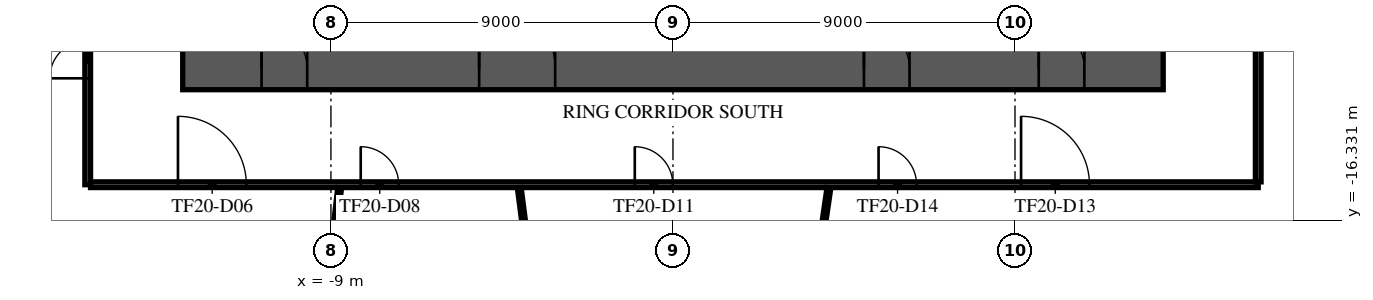
"""IFC4 building model, lengths in metres.
Left out: names, types, materials, properties, quantities, classifications, styles, units other than length and angle.
Written with IfcOpenShell. Run it as: python <this file> out.ifc"""

import sys

from ifc_helpers import new_model, si_unit, direction, frame, frame_2d, origin, place, context, subcontext, project, spatial, rectangle, extrude, element, fill, save


model = new_model("IFC4")
c1 = context("Model", 3, precision=1e-05, world=origin(), true_north=direction((0.0, 1.0)))
c2 = subcontext(c1, "Body", "Model", "MODEL_VIEW")
j1 = project(units=[si_unit("LENGTHUNIT", "METRE"), si_unit("PLANEANGLEUNIT", "RADIAN")], contexts=[c1])
p1 = place(None, origin())
s1 = spatial("IfcSite", under=j1, at=p1, CompositionType="ELEMENT")
p2 = place(p1, origin())
s2 = spatial("IfcBuilding", under=s1, at=p2, CompositionType="ELEMENT")
p3 = place(p2, frame((0.0, 0.0, 90.1)))
s3 = spatial("IfcBuildingStorey", under=s2, at=p3, CompositionType="ELEMENT", Elevation=90.1)
p4 = place(p3, frame((-12.9, -12.35, 0.0), z_axis=(0.0, 0.0, 1.0), x_axis=(1.0, 0.0, 0.0)))
e1 = element("IfcWall", 1, at=p4, inside=s3, PredefinedType="SHEAR", context=c2, shape_type="SweptSolid", body=[
    extrude(rectangle(XDim=25.8, YDim=1.1, at=frame_2d((12.9, 0.0))), origin(), (0.0, 0.0, 1.0), 3.58),
])
p5 = place(p4, frame((7.8, 0.0, 0.0)))
e2 = element("IfcOpeningElement", 2, at=p5, cuts=e1, PredefinedType="OPENING", context=c2, shape_type="SweptSolid", body=[
    extrude(rectangle(XDim=2.0, YDim=2.1, at=frame_2d((1.0, 1.05))), frame((0.0, 0.56, 0.0), z_axis=(0.0, -1.0, 0.0), x_axis=(1.0, 0.0, 0.0)), (0.0, 0.0, 1.0), 1.12),
])
p6 = place(p4, frame((17.925, 0.0, 0.0)))
e3 = element("IfcOpeningElement", 3, at=p6, cuts=e1, PredefinedType="OPENING", context=c2, shape_type="SweptSolid", body=[
    extrude(rectangle(XDim=1.2, YDim=2.1, at=frame_2d((0.6, 1.05))), frame((0.0, 0.56, 0.0), z_axis=(0.0, -1.0, 0.0), x_axis=(1.0, 0.0, 0.0)), (0.0, 0.0, 1.0), 1.12),
])
p7 = place(p4, frame((2.075, 0.0, 0.0)))
e4 = element("IfcOpeningElement", 4, at=p7, cuts=e1, PredefinedType="OPENING", context=c2, shape_type="SweptSolid", body=[
    extrude(rectangle(XDim=1.2, YDim=2.1, at=frame_2d((0.6, 1.05))), frame((0.0, 0.56, 0.0), z_axis=(0.0, -1.0, 0.0), x_axis=(1.0, 0.0, 0.0)), (0.0, 0.0, 1.0), 1.12),
])
p8 = place(p4, frame((22.525, 0.0, 0.0)))
e5 = element("IfcOpeningElement", 5, at=p8, cuts=e1, PredefinedType="OPENING", context=c2, shape_type="SweptSolid", body=[
    extrude(rectangle(XDim=1.2, YDim=2.1, at=frame_2d((0.6, 1.05))), frame((0.0, 0.56, 0.0), z_axis=(0.0, -1.0, 0.0), x_axis=(1.0, 0.0, 0.0)), (0.0, 0.0, 1.0), 1.12),
])
p9 = place(p3, frame((-15.4, -15.4, 0.0), z_axis=(0.0, 0.0, 1.0), x_axis=(0.0, 1.0, 0.0)))
e6 = element("IfcWall", 6, at=p9, inside=s3, PredefinedType="PARTITIONING", context=c2, shape_type="SweptSolid", body=[
    extrude(rectangle(XDim=30.8, YDim=0.15, at=frame_2d((15.4, 0.0))), origin(), (0.0, 0.0, 1.0), 3.08),
])
p10 = place(p9, frame((22.967, 0.0, 0.0)))
e7 = element("IfcOpeningElement", 7, at=p10, cuts=e6, PredefinedType="OPENING", context=c2, shape_type="SweptSolid", body=[
    extrude(rectangle(XDim=1.8, YDim=2.1, at=frame_2d((0.9, 1.05))), frame((0.0, 0.085, 0.0), z_axis=(0.0, -1.0, 0.0), x_axis=(1.0, 0.0, 0.0)), (0.0, 0.0, 1.0), 0.17),
])
p11 = place(p9, frame((19.37, 0.0, 0.0)))
e8 = element("IfcOpeningElement", 8, at=p11, cuts=e6, PredefinedType="OPENING", context=c2, shape_type="SweptSolid", body=[
    extrude(rectangle(XDim=1.0, YDim=2.1, at=frame_2d((0.5, 1.05))), frame((0.0, 0.085, 0.0), z_axis=(0.0, -1.0, 0.0), x_axis=(1.0, 0.0, 0.0)), (0.0, 0.0, 1.0), 0.17),
])
p12 = place(p9, frame((7.15, 0.0, 0.0)))
e9 = element("IfcOpeningElement", 9, at=p12, cuts=e6, PredefinedType="OPENING", context=c2, shape_type="SweptSolid", body=[
    extrude(rectangle(XDim=1.0, YDim=2.1, at=frame_2d((0.5, 1.05))), frame((0.0, 0.085, 0.0), z_axis=(0.0, -1.0, 0.0), x_axis=(1.0, 0.0, 0.0)), (0.0, 0.0, 1.0), 0.17),
])
p13 = place(p9, frame((27.863, 0.0, 0.0)))
e10 = element("IfcOpeningElement", 10, at=p13, cuts=e6, PredefinedType="OPENING", context=c2, shape_type="SweptSolid", body=[
    extrude(rectangle(XDim=1.0, YDim=2.1, at=frame_2d((0.5, 1.05))), frame((0.0, 0.085, 0.0), z_axis=(0.0, -1.0, 0.0), x_axis=(1.0, 0.0, 0.0)), (0.0, 0.0, 1.0), 0.17),
])
p14 = place(p9, frame((2.8, 0.0, 0.0)))
e11 = element("IfcOpeningElement", 11, at=p14, cuts=e6, PredefinedType="OPENING", context=c2, shape_type="SweptSolid", body=[
    extrude(rectangle(XDim=1.0, YDim=2.1, at=frame_2d((0.5, 1.05))), frame((0.0, 0.085, 0.0), z_axis=(0.0, -1.0, 0.0), x_axis=(1.0, 0.0, 0.0)), (0.0, 0.0, 1.0), 0.17),
])
p15 = place(p3, frame((-15.325, -15.4, 0.0), z_axis=(0.0, 0.0, 1.0), x_axis=(1.0, 0.0, 0.0)))
e12 = element("IfcWall", 12, at=p15, inside=s3, PredefinedType="PARTITIONING", context=c2, shape_type="SweptSolid", body=[
    extrude(rectangle(XDim=30.725, YDim=0.15, at=frame_2d((15.362, 0.0))), origin(), (0.0, 0.0, 1.0), 3.08),
])
p16 = place(p15, frame((2.3, 0.0, 0.0)))
e13 = element("IfcOpeningElement", 13, at=p16, cuts=e12, PredefinedType="OPENING", context=c2, shape_type="SweptSolid", body=[
    extrude(rectangle(XDim=1.8, YDim=2.1, at=frame_2d((0.9, 1.05))), frame((0.0, 0.085, 0.0), z_axis=(0.0, -1.0, 0.0), x_axis=(1.0, 0.0, 0.0)), (0.0, 0.0, 1.0), 0.17),
])
p17 = place(p15, frame((7.109, 0.0, 0.0)))
e14 = element("IfcOpeningElement", 14, at=p17, cuts=e12, PredefinedType="OPENING", context=c2, shape_type="SweptSolid", body=[
    extrude(rectangle(XDim=1.0, YDim=2.1, at=frame_2d((0.5, 1.05))), frame((0.0, 0.085, 0.0), z_axis=(0.0, -1.0, 0.0), x_axis=(1.0, 0.0, 0.0)), (0.0, 0.0, 1.0), 0.17),
])
p18 = place(p15, frame((14.32, 0.0, 0.0)))
e15 = element("IfcOpeningElement", 15, at=p18, cuts=e12, PredefinedType="OPENING", context=c2, shape_type="SweptSolid", body=[
    extrude(rectangle(XDim=1.0, YDim=2.1, at=frame_2d((0.5, 1.05))), frame((0.0, 0.085, 0.0), z_axis=(0.0, -1.0, 0.0), x_axis=(1.0, 0.0, 0.0)), (0.0, 0.0, 1.0), 0.17),
])
p19 = place(p15, frame((24.485, 0.0, 0.0)))
e16 = element("IfcOpeningElement", 16, at=p19, cuts=e12, PredefinedType="OPENING", context=c2, shape_type="SweptSolid", body=[
    extrude(rectangle(XDim=1.8, YDim=2.1, at=frame_2d((0.9, 1.05))), frame((0.0, 0.085, 0.0), z_axis=(0.0, -1.0, 0.0), x_axis=(1.0, 0.0, 0.0)), (0.0, 0.0, 1.0), 0.17),
])
p20 = place(p15, frame((20.735, 0.0, 0.0)))
e17 = element("IfcOpeningElement", 17, at=p20, cuts=e12, PredefinedType="OPENING", context=c2, shape_type="SweptSolid", body=[
    extrude(rectangle(XDim=1.0, YDim=2.1, at=frame_2d((0.5, 1.05))), frame((0.0, 0.085, 0.0), z_axis=(0.0, -1.0, 0.0), x_axis=(1.0, 0.0, 0.0)), (0.0, 0.0, 1.0), 0.17),
])
p21 = place(p3, frame((15.4, -15.325, 0.0), z_axis=(0.0, 0.0, 1.0), x_axis=(0.0, 1.0, 0.0)))
e18 = element("IfcWall", 18, at=p21, inside=s3, PredefinedType="PARTITIONING", context=c2, shape_type="SweptSolid", body=[
    extrude(rectangle(XDim=30.65, YDim=0.15, at=frame_2d((15.325, 0.0))), origin(), (0.0, 0.0, 1.0), 3.08),
])
p22 = place(p21, frame((26.288, 0.0, 0.0)))
e19 = element("IfcOpeningElement", 19, at=p22, cuts=e18, PredefinedType="OPENING", context=c2, shape_type="SweptSolid", body=[
    extrude(rectangle(XDim=1.0, YDim=2.1, at=frame_2d((0.5, 1.05))), frame((0.0, 0.085, 0.0), z_axis=(0.0, -1.0, 0.0), x_axis=(1.0, 0.0, 0.0)), (0.0, 0.0, 1.0), 0.17),
])
p23 = place(p21, frame((21.949, 0.0, 0.0)))
e20 = element("IfcOpeningElement", 20, at=p23, cuts=e18, PredefinedType="OPENING", context=c2, shape_type="SweptSolid", body=[
    extrude(rectangle(XDim=1.0, YDim=2.1, at=frame_2d((0.5, 1.05))), frame((0.0, 0.085, 0.0), z_axis=(0.0, -1.0, 0.0), x_axis=(1.0, 0.0, 0.0)), (0.0, 0.0, 1.0), 0.17),
])
p24 = place(p21, frame((14.27, 0.0, 0.0)))
e21 = element("IfcOpeningElement", 21, at=p24, cuts=e18, PredefinedType="OPENING", context=c2, shape_type="SweptSolid", body=[
    extrude(rectangle(XDim=1.0, YDim=2.1, at=frame_2d((0.5, 1.05))), frame((0.0, 0.085, 0.0), z_axis=(0.0, -1.0, 0.0), x_axis=(1.0, 0.0, 0.0)), (0.0, 0.0, 1.0), 0.17),
])
p25 = place(p21, frame((6.038, 0.0, 0.0)))
e22 = element("IfcOpeningElement", 22, at=p25, cuts=e18, PredefinedType="OPENING", context=c2, shape_type="SweptSolid", body=[
    extrude(rectangle(XDim=1.8, YDim=2.1, at=frame_2d((0.9, 1.05))), frame((0.0, 0.085, 0.0), z_axis=(0.0, -1.0, 0.0), x_axis=(1.0, 0.0, 0.0)), (0.0, 0.0, 1.0), 0.17),
])
p26 = place(p3, frame((-10.726, -32.293, 0.0), z_axis=(0.0, 0.0, 1.0), x_axis=(0.115510456464, 0.993306264174, 0.0)))
e23 = element("IfcWall", 23, at=p26, inside=s3, PredefinedType="PARTITIONING", context=c2, shape_type="SweptSolid", body=[
    extrude(rectangle(XDim=16.926, YDim=0.1, at=frame_2d((8.463, 0.0))), origin(), (0.0, 0.0, 1.0), 2.83),
])
p27 = place(p3, frame((-4.044, -15.481, 0.0), z_axis=(0.0, 0.0, 1.0), x_axis=(0.12789369757, -0.991787881617, 0.0)))
e24 = element("IfcWall", 24, at=p27, inside=s3, PredefinedType="PARTITIONING", context=c2, shape_type="SweptSolid", body=[
    extrude(rectangle(XDim=14.168, YDim=0.1, at=frame_2d((7.084, 0.0))), origin(), (0.0, 0.0, 1.0), 2.83),
])
p28 = place(p3, frame((2.264, -28.072, 0.0), z_axis=(0.0, 0.0, 1.0), x_axis=(0.144598494154, 0.989490412025, 0.0)))
e25 = element("IfcWall", 25, at=p28, inside=s3, PredefinedType="PARTITIONING", context=c2, shape_type="SweptSolid", body=[
    extrude(rectangle(XDim=12.724, YDim=0.1, at=frame_2d((6.362, 0.0))), origin(), (0.0, 0.0, 1.0), 2.83),
])
p29 = place(p3, frame((15.478, -11.34, 0.0), z_axis=(0.0, 0.0, 1.0), x_axis=(0.998040108865, -0.062577480745, 0.0)))
e26 = element("IfcWall", 26, at=p29, inside=s3, PredefinedType="PARTITIONING", context=c2, shape_type="SweptSolid", body=[
    extrude(rectangle(XDim=13.811, YDim=0.1, at=frame_2d((6.906, 0.0))), origin(), (0.0, 0.0, 1.0), 2.96),
])
p30 = place(p5, origin())
e27 = element("IfcDoor", 27, at=p30, inside=s3, OperationType="SINGLE_SWING_LEFT", PredefinedType="DOOR", context=c2, shape_type="SweptSolid", body=[
    extrude(rectangle(XDim=2.0, YDim=2.1, at=frame_2d((1.0, 1.05))), frame((0.0, 0.025, 0.0), z_axis=(0.0, -1.0, 0.0), x_axis=(1.0, 0.0, 0.0)), (0.0, 0.0, 1.0), 0.05),
])
fill(e2, e27)
p31 = place(p6, origin())
e28 = element("IfcDoor", 28, at=p31, inside=s3, OperationType="SINGLE_SWING_LEFT", PredefinedType="DOOR", context=c2, shape_type="SweptSolid", body=[
    extrude(rectangle(XDim=1.2, YDim=2.1, at=frame_2d((0.6, 1.05))), frame((0.0, 0.025, 0.0), z_axis=(0.0, -1.0, 0.0), x_axis=(1.0, 0.0, 0.0)), (0.0, 0.0, 1.0), 0.05),
])
fill(e3, e28)
p32 = place(p7, origin())
e29 = element("IfcDoor", 29, at=p32, inside=s3, OperationType="SINGLE_SWING_LEFT", PredefinedType="DOOR", context=c2, shape_type="SweptSolid", body=[
    extrude(rectangle(XDim=1.2, YDim=2.1, at=frame_2d((0.6, 1.05))), frame((0.0, 0.025, 0.0), z_axis=(0.0, -1.0, 0.0), x_axis=(1.0, 0.0, 0.0)), (0.0, 0.0, 1.0), 0.05),
])
fill(e4, e29)
p33 = place(p8, origin())
e30 = element("IfcDoor", 30, at=p33, inside=s3, OperationType="SINGLE_SWING_LEFT", PredefinedType="DOOR", context=c2, shape_type="SweptSolid", body=[
    extrude(rectangle(XDim=1.2, YDim=2.1, at=frame_2d((0.6, 1.05))), frame((0.0, 0.025, 0.0), z_axis=(0.0, -1.0, 0.0), x_axis=(1.0, 0.0, 0.0)), (0.0, 0.0, 1.0), 0.05),
])
fill(e5, e30)
p34 = place(p16, frame((1.8, 0.0, 0.0), z_axis=(0.0, 0.0, 1.0), x_axis=(-1.0, 0.0, 0.0)))
e31 = element("IfcDoor", 31, at=p34, inside=s3, OperationType="DOUBLE_DOOR_SINGLE_SWING", PredefinedType="DOOR", context=c2, shape_type="SweptSolid", body=[
    extrude(rectangle(XDim=1.8, YDim=2.1, at=frame_2d((0.9, 1.05))), frame((0.0, 0.025, 0.0), z_axis=(0.0, -1.0, 0.0), x_axis=(1.0, 0.0, 0.0)), (0.0, 0.0, 1.0), 0.05),
])
fill(e13, e31)
p35 = place(p14, origin())
e32 = element("IfcDoor", 32, at=p35, inside=s3, OperationType="SINGLE_SWING_RIGHT", PredefinedType="DOOR", context=c2, shape_type="SweptSolid", body=[
    extrude(rectangle(XDim=1.0, YDim=2.1, at=frame_2d((0.5, 1.05))), frame((0.0, 0.025, 0.0), z_axis=(0.0, -1.0, 0.0), x_axis=(1.0, 0.0, 0.0)), (0.0, 0.0, 1.0), 0.05),
])
fill(e11, e32)
p36 = place(p17, frame((1.0, 0.0, 0.0), z_axis=(0.0, 0.0, 1.0), x_axis=(-1.0, 0.0, 0.0)))
e33 = element("IfcDoor", 33, at=p36, inside=s3, OperationType="SINGLE_SWING_LEFT", PredefinedType="DOOR", context=c2, shape_type="SweptSolid", body=[
    extrude(rectangle(XDim=1.0, YDim=2.1, at=frame_2d((0.5, 1.05))), frame((0.0, 0.025, 0.0), z_axis=(0.0, -1.0, 0.0), x_axis=(1.0, 0.0, 0.0)), (0.0, 0.0, 1.0), 0.05),
])
fill(e14, e33)
p37 = place(p18, frame((1.0, 0.0, 0.0), z_axis=(0.0, 0.0, 1.0), x_axis=(-1.0, 0.0, 0.0)))
e34 = element("IfcDoor", 34, at=p37, inside=s3, OperationType="SINGLE_SWING_LEFT", PredefinedType="DOOR", context=c2, shape_type="SweptSolid", body=[
    extrude(rectangle(XDim=1.0, YDim=2.1, at=frame_2d((0.5, 1.05))), frame((0.0, 0.025, 0.0), z_axis=(0.0, -1.0, 0.0), x_axis=(1.0, 0.0, 0.0)), (0.0, 0.0, 1.0), 0.05),
])
fill(e15, e34)
p38 = place(p19, frame((1.8, 0.0, 0.0), z_axis=(0.0, 0.0, 1.0), x_axis=(-1.0, 0.0, 0.0)))
e35 = element("IfcDoor", 35, at=p38, inside=s3, OperationType="DOUBLE_DOOR_SINGLE_SWING", PredefinedType="DOOR", context=c2, shape_type="SweptSolid", body=[
    extrude(rectangle(XDim=1.8, YDim=2.1, at=frame_2d((0.9, 1.05))), frame((0.0, 0.025, 0.0), z_axis=(0.0, -1.0, 0.0), x_axis=(1.0, 0.0, 0.0)), (0.0, 0.0, 1.0), 0.05),
])
fill(e16, e35)
p39 = place(p20, frame((1.0, 0.0, 0.0), z_axis=(0.0, 0.0, 1.0), x_axis=(-1.0, 0.0, 0.0)))
e36 = element("IfcDoor", 36, at=p39, inside=s3, OperationType="SINGLE_SWING_LEFT", PredefinedType="DOOR", context=c2, shape_type="SweptSolid", body=[
    extrude(rectangle(XDim=1.0, YDim=2.1, at=frame_2d((0.5, 1.05))), frame((0.0, 0.025, 0.0), z_axis=(0.0, -1.0, 0.0), x_axis=(1.0, 0.0, 0.0)), (0.0, 0.0, 1.0), 0.05),
])
fill(e17, e36)
save(model, sys.argv[1])
